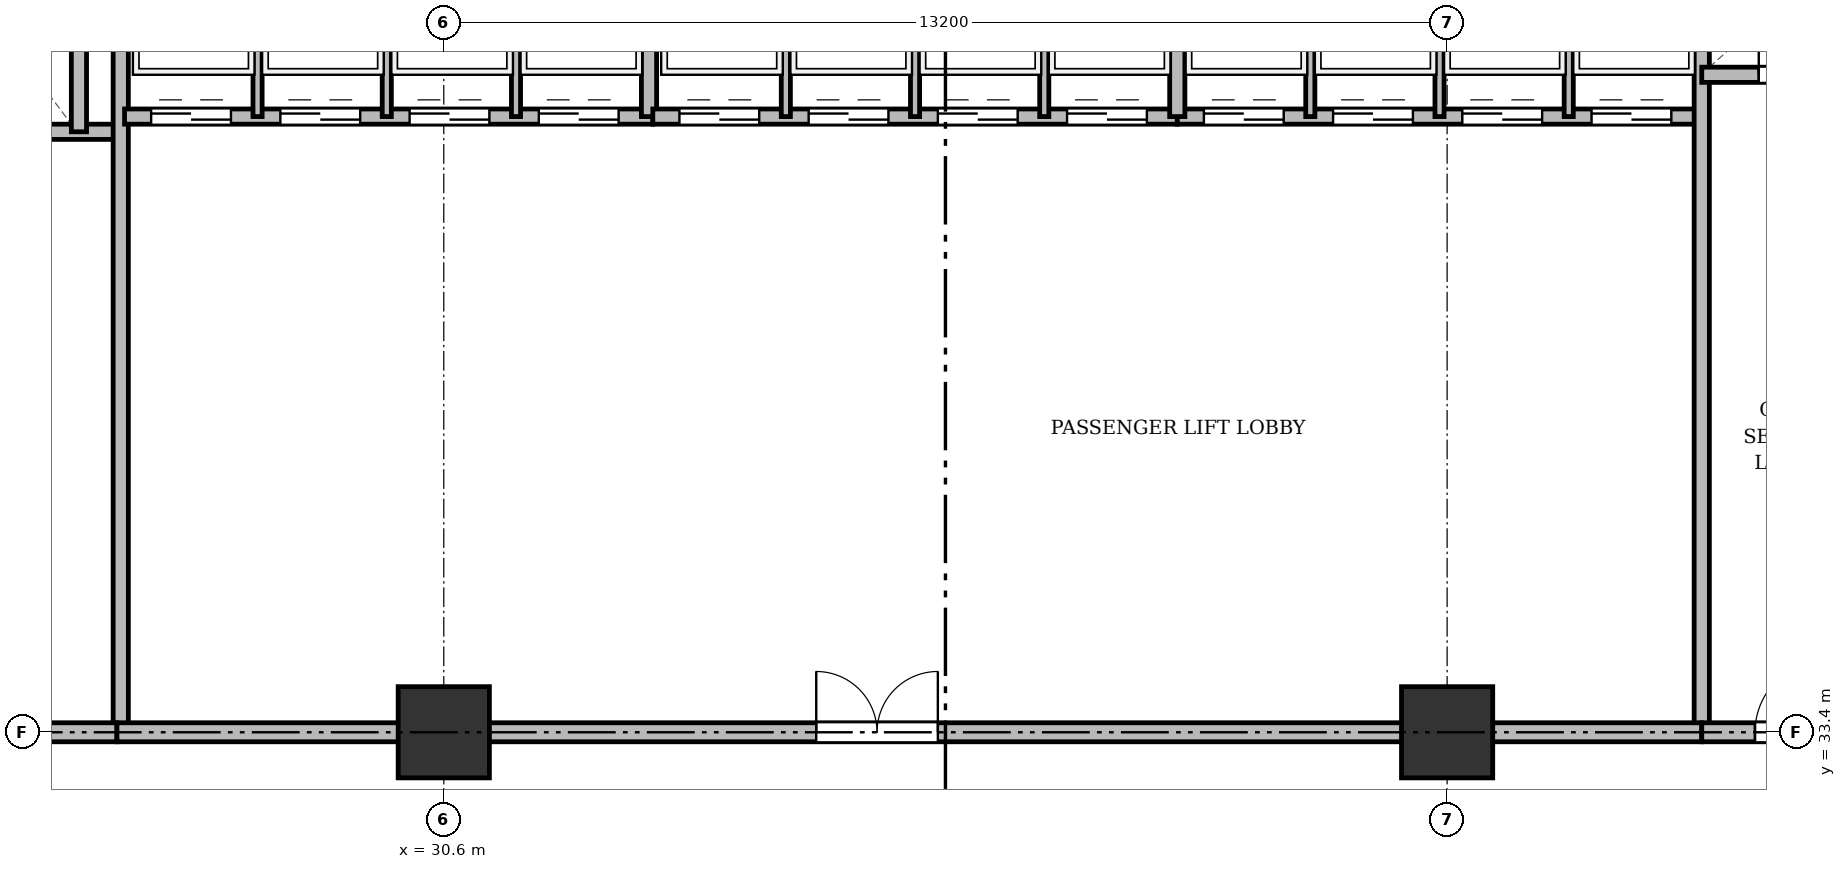
"""IFC4 building model, lengths in metres.
Left out: names, types, materials, properties, quantities, classifications, styles, units other than length and angle.
Written with IfcOpenShell. Run it as: python <this file> out.ifc"""

import sys

from ifc_helpers import new_model, si_unit, direction, frame, frame_2d, origin, origin_2d, place, context, subcontext, project, spatial, rectangle, extrude, source, transform, mapped, element, fill, save


model = new_model("IFC4")
c1 = context("Model", 3, precision=1e-05, world=origin(), true_north=direction((0.0, 1.0)))
c2 = subcontext(c1, "Body", "Model", "MODEL_VIEW")
j1 = project(units=[si_unit("LENGTHUNIT", "METRE"), si_unit("PLANEANGLEUNIT", "RADIAN")], contexts=[c1])
p1 = place(None, origin())
s1 = spatial("IfcSite", under=j1, at=p1, CompositionType="ELEMENT")
p2 = place(p1, origin())
s2 = spatial("IfcBuilding", under=s1, at=p2, CompositionType="ELEMENT")
p3 = place(p2, origin())
s3 = spatial("IfcBuildingStorey", under=s2, at=p3, CompositionType="ELEMENT", Elevation=0.0)
m1 = source(origin(), c2, "Body", "SweptSolid", [
    extrude(rectangle(XDim=1.2, YDim=1.2, at=origin_2d()), origin(), (0.0, 0.0, 1.0), 5.2),
])
for number, where, z_axis, x_axis in (
    (1, (30.6, 33.4, 0.0), (0.0, 0.0, 1.0), (1.0, 0.0, 0.0)),
    (2, (43.8, 33.4, 0.0), (0.0, 0.0, 1.0), (1.0, 0.0, 0.0)),
):
    element("IfcColumn", number, at=place(p3, frame(where, z_axis=z_axis, x_axis=x_axis)), inside=s3, PredefinedType="COLUMN", context=c2, shape_type="MappedRepresentation", body=[
        mapped(m1, transform((0.0, 0.0, 0.0), x_axis=(1.0, 0.0, 0.0), y_axis=(0.0, 1.0, 0.0), z_axis=(0.0, 0.0, 1.0), scale=1.0)),
    ])
p4 = place(p3, frame((19.55, 41.3, 0.0), z_axis=(0.0, 0.0, 1.0), x_axis=(1.0, 0.0, 0.0)))
e3 = element("IfcWall", 3, at=p4, inside=s3, PredefinedType="SOLIDWALL", context=c2, shape_type="SweptSolid", body=[
    extrude(rectangle(XDim=6.75, YDim=0.2, at=frame_2d((3.375, 0.0))), origin(), (0.0, 0.0, 1.0), 4.88),
])
p5 = place(p4, frame((1.7, 0.0, 0.0)))
e4 = element("IfcOpeningElement", 4, at=p5, cuts=e3, PredefinedType="OPENING", context=c2, shape_type="SweptSolid", body=[
    extrude(rectangle(XDim=1.1, YDim=2.15, at=frame_2d((0.55, 1.075))), frame((0.0, 0.11, 0.0), z_axis=(0.0, -1.0, 0.0), x_axis=(1.0, 0.0, 0.0)), (0.0, 0.0, 1.0), 0.22),
])
p6 = place(p4, frame((4.4, 0.0, 0.0)))
e5 = element("IfcOpeningElement", 5, at=p6, cuts=e3, PredefinedType="OPENING", context=c2, shape_type="SweptSolid", body=[
    extrude(rectangle(XDim=1.1, YDim=2.15, at=frame_2d((0.55, 1.075))), frame((0.0, 0.11, 0.0), z_axis=(0.0, -1.0, 0.0), x_axis=(1.0, 0.0, 0.0)), (0.0, 0.0, 1.0), 0.22),
])
p7 = place(p3, frame((25.8, 41.3, 0.0), z_axis=(0.0, 0.0, 1.0), x_axis=(0.0, 1.0, 0.0)))
e6 = element("IfcWall", 6, at=p7, inside=s3, PredefinedType="SOLIDWALL", context=c2, shape_type="SweptSolid", body=[
    extrude(rectangle(XDim=3.4, YDim=0.2, at=frame_2d((1.7, 0.0))), origin(), (0.0, 0.0, 1.0), 4.88),
])
p8 = place(p3, frame((26.35, 33.4, 0.0), z_axis=(0.0, 0.0, 1.0), x_axis=(0.0, 1.0, 0.0)))
e7 = element("IfcWall", 7, at=p8, inside=s3, PredefinedType="SOLIDWALL", context=c2, shape_type="SweptSolid", body=[
    extrude(rectangle(XDim=11.3, YDim=0.2, at=frame_2d((5.65, 0.0))), origin(), (0.0, 0.0, 1.0), 3.78),
])
p9 = place(p3, frame((19.5, 33.4, 0.0), z_axis=(0.0, 0.0, 1.0), x_axis=(1.0, 0.0, 0.0)))
e8 = element("IfcWall", 8, at=p9, inside=s3, PredefinedType="PARTITIONING", context=c2, shape_type="SweptSolid", body=[
    extrude(rectangle(XDim=6.8, YDim=0.25, at=frame_2d((3.4, 0.0))), origin(), (0.0, 0.0, 1.0), 3.78),
])
p10 = place(p9, frame((0.75, 0.0, 0.0)))
e9 = element("IfcOpeningElement", 9, at=p10, cuts=e8, PredefinedType="OPENING", context=c2, shape_type="SweptSolid", body=[
    extrude(rectangle(XDim=1.6, YDim=2.2, at=frame_2d((0.8, 1.1))), frame((0.0, 0.135, 0.0), z_axis=(0.0, -1.0, 0.0), x_axis=(1.0, 0.0, 0.0)), (0.0, 0.0, 1.0), 0.27),
])
p11 = place(p3, frame((26.4, 41.5, 0.0), z_axis=(0.0, 0.0, 1.0), x_axis=(1.0, 0.0, 0.0)))
e10 = element("IfcWall", 10, at=p11, inside=s3, PredefinedType="SOLIDWALL", context=c2, shape_type="SweptSolid", body=[
    extrude(rectangle(XDim=6.95, YDim=0.2, at=frame_2d((3.475, 0.0))), origin(), (0.0, 0.0, 1.0), 4.88),
])
p12 = place(p11, frame((0.35, 0.0, 0.0)))
e11 = element("IfcOpeningElement", 11, at=p12, cuts=e10, PredefinedType="OPENING", context=c2, shape_type="SweptSolid", body=[
    extrude(rectangle(XDim=1.05, YDim=2.15, at=frame_2d((0.525, 1.075))), frame((0.0, 0.11, 0.0), z_axis=(0.0, -1.0, 0.0), x_axis=(1.0, 0.0, 0.0)), (0.0, 0.0, 1.0), 0.22),
])
p13 = place(p11, frame((2.05, 0.0, 0.0)))
e12 = element("IfcOpeningElement", 12, at=p13, cuts=e10, PredefinedType="OPENING", context=c2, shape_type="SweptSolid", body=[
    extrude(rectangle(XDim=1.05, YDim=2.15, at=frame_2d((0.525, 1.075))), frame((0.0, 0.11, 0.0), z_axis=(0.0, -1.0, 0.0), x_axis=(1.0, 0.0, 0.0)), (0.0, 0.0, 1.0), 0.22),
])
p14 = place(p11, frame((3.75, 0.0, 0.0)))
e13 = element("IfcOpeningElement", 13, at=p14, cuts=e10, PredefinedType="OPENING", context=c2, shape_type="SweptSolid", body=[
    extrude(rectangle(XDim=1.05, YDim=2.15, at=frame_2d((0.525, 1.075))), frame((0.0, 0.11, 0.0), z_axis=(0.0, -1.0, 0.0), x_axis=(1.0, 0.0, 0.0)), (0.0, 0.0, 1.0), 0.22),
])
p15 = place(p11, frame((5.45, 0.0, 0.0)))
e14 = element("IfcOpeningElement", 14, at=p15, cuts=e10, PredefinedType="OPENING", context=c2, shape_type="SweptSolid", body=[
    extrude(rectangle(XDim=1.05, YDim=2.15, at=frame_2d((0.525, 1.075))), frame((0.0, 0.11, 0.0), z_axis=(0.0, -1.0, 0.0), x_axis=(1.0, 0.0, 0.0)), (0.0, 0.0, 1.0), 0.22),
])
p16 = place(p3, frame((33.3, 41.5, 0.0), z_axis=(0.0, 0.0, 1.0), x_axis=(0.0, 1.0, 0.0)))
e15 = element("IfcWall", 15, at=p16, inside=s3, PredefinedType="SOLIDWALL", context=c2, shape_type="SweptSolid", body=[
    extrude(rectangle(XDim=3.2, YDim=0.2, at=frame_2d((1.6, 0.0))), origin(), (0.0, 0.0, 1.0), 4.88),
])
for number, where, z_axis, x_axis in (
    (16, (28.15, 41.5, 0.0), (0.0, 0.0, 1.0), (0.0, 1.0, 0.0)),
    (17, (29.85, 41.5, 0.0), (0.0, 0.0, 1.0), (0.0, 1.0, 0.0)),
    (18, (31.55, 41.5, 0.0), (0.0, 0.0, 1.0), (0.0, 1.0, 0.0)),
):
    element("IfcWall", number, at=place(p3, frame(where, z_axis=z_axis, x_axis=x_axis)), inside=s3, PredefinedType="PARTITIONING", context=c2, shape_type="SweptSolid", body=[
        extrude(rectangle(XDim=3.2, YDim=0.12, at=frame_2d((1.6, 0.0))), origin(), (0.0, 0.0, 1.0), 4.88),
    ])
p17 = place(p3, frame((33.35, 41.5, 0.0), z_axis=(0.0, 0.0, 1.0), x_axis=(1.0, 0.0, 0.0)))
e19 = element("IfcWall", 19, at=p17, inside=s3, PredefinedType="SOLIDWALL", context=c2, shape_type="SweptSolid", body=[
    extrude(rectangle(XDim=6.9, YDim=0.2, at=frame_2d((3.45, 0.0))), origin(), (0.0, 0.0, 1.0), 4.88),
])
p18 = place(p17, frame((0.35, 0.0, 0.0)))
e20 = element("IfcOpeningElement", 20, at=p18, cuts=e19, PredefinedType="OPENING", context=c2, shape_type="SweptSolid", body=[
    extrude(rectangle(XDim=1.05, YDim=2.15, at=frame_2d((0.525, 1.075))), frame((0.0, 0.11, 0.0), z_axis=(0.0, -1.0, 0.0), x_axis=(1.0, 0.0, 0.0)), (0.0, 0.0, 1.0), 0.22),
])
p19 = place(p17, frame((2.05, 0.0, 0.0)))
e21 = element("IfcOpeningElement", 21, at=p19, cuts=e19, PredefinedType="OPENING", context=c2, shape_type="SweptSolid", body=[
    extrude(rectangle(XDim=1.05, YDim=2.15, at=frame_2d((0.525, 1.075))), frame((0.0, 0.11, 0.0), z_axis=(0.0, -1.0, 0.0), x_axis=(1.0, 0.0, 0.0)), (0.0, 0.0, 1.0), 0.22),
])
p20 = place(p17, frame((3.75, 0.0, 0.0)))
e22 = element("IfcOpeningElement", 22, at=p20, cuts=e19, PredefinedType="OPENING", context=c2, shape_type="SweptSolid", body=[
    extrude(rectangle(XDim=1.05, YDim=2.15, at=frame_2d((0.525, 1.075))), frame((0.0, 0.11, 0.0), z_axis=(0.0, -1.0, 0.0), x_axis=(1.0, 0.0, 0.0)), (0.0, 0.0, 1.0), 0.22),
])
p21 = place(p17, frame((5.45, 0.0, 0.0)))
e23 = element("IfcOpeningElement", 23, at=p21, cuts=e19, PredefinedType="OPENING", context=c2, shape_type="SweptSolid", body=[
    extrude(rectangle(XDim=1.05, YDim=2.15, at=frame_2d((0.525, 1.075))), frame((0.0, 0.11, 0.0), z_axis=(0.0, -1.0, 0.0), x_axis=(1.0, 0.0, 0.0)), (0.0, 0.0, 1.0), 0.22),
])
for number, where, z_axis, x_axis in (
    (24, (35.1, 41.5, 0.0), (0.0, 0.0, 1.0), (0.0, 1.0, 0.0)),
    (25, (36.8, 41.5, 0.0), (0.0, 0.0, 1.0), (0.0, 1.0, 0.0)),
    (26, (38.5, 41.5, 0.0), (0.0, 0.0, 1.0), (0.0, 1.0, 0.0)),
):
    element("IfcWall", number, at=place(p3, frame(where, z_axis=z_axis, x_axis=x_axis)), inside=s3, PredefinedType="PARTITIONING", context=c2, shape_type="SweptSolid", body=[
        extrude(rectangle(XDim=3.2, YDim=0.12, at=frame_2d((1.6, 0.0))), origin(), (0.0, 0.0, 1.0), 4.88),
    ])
p22 = place(p3, frame((40.25, 41.5, 0.0), z_axis=(0.0, 0.0, 1.0), x_axis=(1.0, 0.0, 0.0)))
e27 = element("IfcWall", 27, at=p22, inside=s3, PredefinedType="SOLIDWALL", context=c2, shape_type="SweptSolid", body=[
    extrude(rectangle(XDim=6.9, YDim=0.2, at=frame_2d((3.45, 0.0))), origin(), (0.0, 0.0, 1.0), 4.08),
])
p23 = place(p22, frame((0.35, 0.0, 0.0)))
e28 = element("IfcOpeningElement", 28, at=p23, cuts=e27, PredefinedType="OPENING", context=c2, shape_type="SweptSolid", body=[
    extrude(rectangle(XDim=1.05, YDim=2.15, at=frame_2d((0.525, 1.075))), frame((0.0, 0.11, 0.0), z_axis=(0.0, -1.0, 0.0), x_axis=(1.0, 0.0, 0.0)), (0.0, 0.0, 1.0), 0.22),
])
p24 = place(p22, frame((2.05, 0.0, 0.0)))
e29 = element("IfcOpeningElement", 29, at=p24, cuts=e27, PredefinedType="OPENING", context=c2, shape_type="SweptSolid", body=[
    extrude(rectangle(XDim=1.05, YDim=2.15, at=frame_2d((0.525, 1.075))), frame((0.0, 0.11, 0.0), z_axis=(0.0, -1.0, 0.0), x_axis=(1.0, 0.0, 0.0)), (0.0, 0.0, 1.0), 0.22),
])
p25 = place(p22, frame((3.75, 0.0, 0.0)))
e30 = element("IfcOpeningElement", 30, at=p25, cuts=e27, PredefinedType="OPENING", context=c2, shape_type="SweptSolid", body=[
    extrude(rectangle(XDim=1.05, YDim=2.15, at=frame_2d((0.525, 1.075))), frame((0.0, 0.11, 0.0), z_axis=(0.0, -1.0, 0.0), x_axis=(1.0, 0.0, 0.0)), (0.0, 0.0, 1.0), 0.22),
])
p26 = place(p22, frame((5.45, 0.0, 0.0)))
e31 = element("IfcOpeningElement", 31, at=p26, cuts=e27, PredefinedType="OPENING", context=c2, shape_type="SweptSolid", body=[
    extrude(rectangle(XDim=1.05, YDim=2.15, at=frame_2d((0.525, 1.075))), frame((0.0, 0.11, 0.0), z_axis=(0.0, -1.0, 0.0), x_axis=(1.0, 0.0, 0.0)), (0.0, 0.0, 1.0), 0.22),
])
p27 = place(p3, frame((40.25, 41.5, 0.0), z_axis=(0.0, 0.0, 1.0), x_axis=(0.0, 1.0, 0.0)))
e32 = element("IfcWall", 32, at=p27, inside=s3, PredefinedType="SOLIDWALL", context=c2, shape_type="SweptSolid", body=[
    extrude(rectangle(XDim=3.2, YDim=0.2, at=frame_2d((1.6, 0.0))), origin(), (0.0, 0.0, 1.0), 4.88),
])
p28 = place(p3, frame((42.0, 41.5, 0.0), z_axis=(0.0, 0.0, 1.0), x_axis=(0.0, 1.0, 0.0)))
e33 = element("IfcWall", 33, at=p28, inside=s3, PredefinedType="PARTITIONING", context=c2, shape_type="SweptSolid", body=[
    extrude(rectangle(XDim=3.2, YDim=0.12, at=frame_2d((1.6, 0.0))), origin(), (0.0, 0.0, 1.0), 4.88),
])
p29 = place(p3, frame((43.7, 41.5, 0.0), z_axis=(0.0, 0.0, 1.0), x_axis=(0.0, 1.0, 0.0)))
e34 = element("IfcWall", 34, at=p29, inside=s3, PredefinedType="PARTITIONING", context=c2, shape_type="SweptSolid", body=[
    extrude(rectangle(XDim=3.2, YDim=0.12, at=frame_2d((1.6, 0.0))), origin(), (0.0, 0.0, 1.0), 4.08),
])
p30 = place(p3, frame((45.4, 41.5, 0.0), z_axis=(0.0, 0.0, 1.0), x_axis=(0.0, 1.0, 0.0)))
e35 = element("IfcWall", 35, at=p30, inside=s3, PredefinedType="PARTITIONING", context=c2, shape_type="SweptSolid", body=[
    extrude(rectangle(XDim=3.2, YDim=0.12, at=frame_2d((1.6, 0.0))), origin(), (0.0, 0.0, 1.0), 4.88),
])
p31 = place(p3, frame((47.15, 33.4, 0.0), z_axis=(0.0, 0.0, 1.0), x_axis=(0.0, 1.0, 0.0)))
e36 = element("IfcWall", 36, at=p31, inside=s3, PredefinedType="SOLIDWALL", context=c2, shape_type="SweptSolid", body=[
    extrude(rectangle(XDim=11.3, YDim=0.2, at=frame_2d((5.65, 0.0))), origin(), (0.0, 0.0, 1.0), 3.78),
])
p32 = place(p3, frame((26.3, 33.4, 0.0), z_axis=(0.0, 0.0, 1.0), x_axis=(1.0, 0.0, 0.0)))
e37 = element("IfcWall", 37, at=p32, inside=s3, PredefinedType="PARTITIONING", context=c2, shape_type="SweptSolid", body=[
    extrude(rectangle(XDim=20.85, YDim=0.25, at=frame_2d((10.425, 0.0))), origin(), (0.0, 0.0, 1.0), 3.78),
])
p33 = place(p32, frame((9.2, 0.0, 0.0)))
e38 = element("IfcOpeningElement", 38, at=p33, cuts=e37, PredefinedType="OPENING", context=c2, shape_type="SweptSolid", body=[
    extrude(rectangle(XDim=1.6, YDim=2.2, at=frame_2d((0.8, 1.1))), frame((0.0, 0.135, 0.0), z_axis=(0.0, -1.0, 0.0), x_axis=(1.0, 0.0, 0.0)), (0.0, 0.0, 1.0), 0.27),
])
p34 = place(p3, frame((47.15, 42.05, 0.0), z_axis=(0.0, 0.0, 1.0), x_axis=(1.0, 0.0, 0.0)))
e39 = element("IfcWall", 39, at=p34, inside=s3, PredefinedType="SOLIDWALL", context=c2, shape_type="SweptSolid", body=[
    extrude(rectangle(XDim=7.85, YDim=0.2, at=frame_2d((3.925, 0.0))), origin(), (0.0, 0.0, 1.0), 4.88),
])
p35 = place(p34, frame((0.75, 0.0, 0.0)))
e40 = element("IfcOpeningElement", 40, at=p35, cuts=e39, PredefinedType="OPENING", context=c2, shape_type="SweptSolid", body=[
    extrude(rectangle(XDim=0.9, YDim=2.1, at=frame_2d((0.45, 1.05))), frame((0.0, 0.11, 0.0), z_axis=(0.0, -1.0, 0.0), x_axis=(1.0, 0.0, 0.0)), (0.0, 0.0, 1.0), 0.22),
])
p36 = place(p34, frame((3.85, 0.0, 0.0)))
e41 = element("IfcOpeningElement", 41, at=p36, cuts=e39, PredefinedType="OPENING", context=c2, shape_type="SweptSolid", body=[
    extrude(rectangle(XDim=0.9, YDim=2.1, at=frame_2d((0.45, 1.05))), frame((0.0, 0.11, 0.0), z_axis=(0.0, -1.0, 0.0), x_axis=(1.0, 0.0, 0.0)), (0.0, 0.0, 1.0), 0.22),
])
p37 = place(p3, frame((47.15, 33.4, 0.0), z_axis=(0.0, 0.0, 1.0), x_axis=(1.0, 0.0, 0.0)))
e42 = element("IfcWall", 42, at=p37, inside=s3, PredefinedType="PARTITIONING", context=c2, shape_type="SweptSolid", body=[
    extrude(rectangle(XDim=11.15, YDim=0.25, at=frame_2d((5.575, 0.0))), origin(), (0.0, 0.0, 1.0), 3.78),
])
p38 = place(p37, frame((0.7, 0.0, 0.0)))
e43 = element("IfcOpeningElement", 43, at=p38, cuts=e42, PredefinedType="OPENING", context=c2, shape_type="SweptSolid", body=[
    extrude(rectangle(XDim=0.95, YDim=2.15, at=frame_2d((0.475, 1.075))), frame((0.0, 0.135, 0.0), z_axis=(0.0, -1.0, 0.0), x_axis=(1.0, 0.0, 0.0)), (0.0, 0.0, 1.0), 0.27),
])
p39 = place(p37, frame((6.0, 0.0, 0.0)))
e44 = element("IfcOpeningElement", 44, at=p39, cuts=e42, PredefinedType="OPENING", context=c2, shape_type="SweptSolid", body=[
    extrude(rectangle(XDim=1.2, YDim=2.15, at=frame_2d((0.6, 1.075))), frame((0.0, 0.135, 0.0), z_axis=(0.0, -1.0, 0.0), x_axis=(1.0, 0.0, 0.0)), (0.0, 0.0, 1.0), 0.27),
])
m2 = source(origin(), c2, "Body", "SweptSolid", [
    extrude(rectangle(XDim=1.05, YDim=2.15, at=frame_2d((0.525, 1.075))), frame((0.0, 0.025, 0.0), z_axis=(0.0, -1.0, 0.0), x_axis=(1.0, 0.0, 0.0)), (0.0, 0.0, 1.0), 0.05),
])
p40 = place(p12, origin())
e45 = element("IfcDoor", 45, at=p40, inside=s3, OperationType="DOUBLE_DOOR_SLIDING", PredefinedType="DOOR", context=c2, shape_type="MappedRepresentation", body=[
    mapped(m2, transform((0.0, 0.0, 0.0), x_axis=(1.0, 0.0, 0.0), y_axis=(0.0, 1.0, 0.0), z_axis=(0.0, 0.0, 1.0), scale=1.0)),
])
fill(e11, e45)
p41 = place(p13, origin())
e46 = element("IfcDoor", 46, at=p41, inside=s3, OperationType="DOUBLE_DOOR_SLIDING", PredefinedType="DOOR", context=c2, shape_type="MappedRepresentation", body=[
    mapped(m2, transform((0.0, 0.0, 0.0), x_axis=(1.0, 0.0, 0.0), y_axis=(0.0, 1.0, 0.0), z_axis=(0.0, 0.0, 1.0), scale=1.0)),
])
fill(e12, e46)
p42 = place(p14, origin())
e47 = element("IfcDoor", 47, at=p42, inside=s3, OperationType="DOUBLE_DOOR_SLIDING", PredefinedType="DOOR", context=c2, shape_type="MappedRepresentation", body=[
    mapped(m2, transform((0.0, 0.0, 0.0), x_axis=(1.0, 0.0, 0.0), y_axis=(0.0, 1.0, 0.0), z_axis=(0.0, 0.0, 1.0), scale=1.0)),
])
fill(e13, e47)
p43 = place(p15, origin())
e48 = element("IfcDoor", 48, at=p43, inside=s3, OperationType="DOUBLE_DOOR_SLIDING", PredefinedType="DOOR", context=c2, shape_type="MappedRepresentation", body=[
    mapped(m2, transform((0.0, 0.0, 0.0), x_axis=(1.0, 0.0, 0.0), y_axis=(0.0, 1.0, 0.0), z_axis=(0.0, 0.0, 1.0), scale=1.0)),
])
fill(e14, e48)
p44 = place(p18, origin())
e49 = element("IfcDoor", 49, at=p44, inside=s3, OperationType="DOUBLE_DOOR_SLIDING", PredefinedType="DOOR", context=c2, shape_type="MappedRepresentation", body=[
    mapped(m2, transform((0.0, 0.0, 0.0), x_axis=(1.0, 0.0, 0.0), y_axis=(0.0, 1.0, 0.0), z_axis=(0.0, 0.0, 1.0), scale=1.0)),
])
fill(e20, e49)
p45 = place(p19, origin())
e50 = element("IfcDoor", 50, at=p45, inside=s3, OperationType="DOUBLE_DOOR_SLIDING", PredefinedType="DOOR", context=c2, shape_type="MappedRepresentation", body=[
    mapped(m2, transform((0.0, 0.0, 0.0), x_axis=(1.0, 0.0, 0.0), y_axis=(0.0, 1.0, 0.0), z_axis=(0.0, 0.0, 1.0), scale=1.0)),
])
fill(e21, e50)
p46 = place(p20, origin())
e51 = element("IfcDoor", 51, at=p46, inside=s3, OperationType="DOUBLE_DOOR_SLIDING", PredefinedType="DOOR", context=c2, shape_type="MappedRepresentation", body=[
    mapped(m2, transform((0.0, 0.0, 0.0), x_axis=(1.0, 0.0, 0.0), y_axis=(0.0, 1.0, 0.0), z_axis=(0.0, 0.0, 1.0), scale=1.0)),
])
fill(e22, e51)
p47 = place(p21, origin())
e52 = element("IfcDoor", 52, at=p47, inside=s3, OperationType="DOUBLE_DOOR_SLIDING", PredefinedType="DOOR", context=c2, shape_type="MappedRepresentation", body=[
    mapped(m2, transform((0.0, 0.0, 0.0), x_axis=(1.0, 0.0, 0.0), y_axis=(0.0, 1.0, 0.0), z_axis=(0.0, 0.0, 1.0), scale=1.0)),
])
fill(e23, e52)
p48 = place(p23, origin())
e53 = element("IfcDoor", 53, at=p48, inside=s3, OperationType="DOUBLE_DOOR_SLIDING", PredefinedType="DOOR", context=c2, shape_type="MappedRepresentation", body=[
    mapped(m2, transform((0.0, 0.0, 0.0), x_axis=(1.0, 0.0, 0.0), y_axis=(0.0, 1.0, 0.0), z_axis=(0.0, 0.0, 1.0), scale=1.0)),
])
fill(e28, e53)
p49 = place(p24, origin())
e54 = element("IfcDoor", 54, at=p49, inside=s3, OperationType="DOUBLE_DOOR_SLIDING", PredefinedType="DOOR", context=c2, shape_type="MappedRepresentation", body=[
    mapped(m2, transform((0.0, 0.0, 0.0), x_axis=(1.0, 0.0, 0.0), y_axis=(0.0, 1.0, 0.0), z_axis=(0.0, 0.0, 1.0), scale=1.0)),
])
fill(e29, e54)
p50 = place(p25, origin())
e55 = element("IfcDoor", 55, at=p50, inside=s3, OperationType="DOUBLE_DOOR_SLIDING", PredefinedType="DOOR", context=c2, shape_type="MappedRepresentation", body=[
    mapped(m2, transform((0.0, 0.0, 0.0), x_axis=(1.0, 0.0, 0.0), y_axis=(0.0, 1.0, 0.0), z_axis=(0.0, 0.0, 1.0), scale=1.0)),
])
fill(e30, e55)
p51 = place(p26, origin())
e56 = element("IfcDoor", 56, at=p51, inside=s3, OperationType="DOUBLE_DOOR_SLIDING", PredefinedType="DOOR", context=c2, shape_type="MappedRepresentation", body=[
    mapped(m2, transform((0.0, 0.0, 0.0), x_axis=(1.0, 0.0, 0.0), y_axis=(0.0, 1.0, 0.0), z_axis=(0.0, 0.0, 1.0), scale=1.0)),
])
fill(e31, e56)
m3 = source(origin(), c2, "Body", "SweptSolid", [
    extrude(rectangle(XDim=1.6, YDim=2.2, at=frame_2d((0.8, 1.1))), frame((0.0, 0.025, 0.0), z_axis=(0.0, -1.0, 0.0), x_axis=(1.0, 0.0, 0.0)), (0.0, 0.0, 1.0), 0.05),
])
p52 = place(p33, origin())
e57 = element("IfcDoor", 57, at=p52, inside=s3, OperationType="DOUBLE_DOOR_SINGLE_SWING", PredefinedType="DOOR", context=c2, shape_type="MappedRepresentation", body=[
    mapped(m3, transform((0.0, 0.0, 0.0), x_axis=(1.0, 0.0, 0.0), y_axis=(0.0, 1.0, 0.0), z_axis=(0.0, 0.0, 1.0), scale=1.0)),
])
fill(e38, e57)
m4 = source(origin(), c2, "Body", "SweptSolid", [
    extrude(rectangle(XDim=0.9, YDim=2.1, at=frame_2d((0.45, 1.05))), frame((0.0, 0.025, 0.0), z_axis=(0.0, -1.0, 0.0), x_axis=(1.0, 0.0, 0.0)), (0.0, 0.0, 1.0), 0.05),
])
p53 = place(p35, origin())
e58 = element("IfcDoor", 58, at=p53, inside=s3, OperationType="SINGLE_SWING_LEFT", PredefinedType="DOOR", context=c2, shape_type="MappedRepresentation", body=[
    mapped(m4, transform((0.0, 0.0, 0.0), x_axis=(1.0, 0.0, 0.0), y_axis=(0.0, 1.0, 0.0), z_axis=(0.0, 0.0, 1.0), scale=1.0)),
])
fill(e40, e58)
m5 = source(origin(), c2, "Body", "SweptSolid", [
    extrude(rectangle(XDim=0.95, YDim=2.15, at=frame_2d((0.475, 1.075))), frame((0.0, 0.025, 0.0), z_axis=(0.0, -1.0, 0.0), x_axis=(1.0, 0.0, 0.0)), (0.0, 0.0, 1.0), 0.05),
])
p54 = place(p38, origin())
e59 = element("IfcDoor", 59, at=p54, inside=s3, OperationType="SINGLE_SWING_RIGHT", PredefinedType="DOOR", context=c2, shape_type="MappedRepresentation", body=[
    mapped(m5, transform((0.0, 0.0, 0.0), x_axis=(1.0, 0.0, 0.0), y_axis=(0.0, 1.0, 0.0), z_axis=(0.0, 0.0, 1.0), scale=1.0)),
])
fill(e43, e59)
save(model, sys.argv[1])
